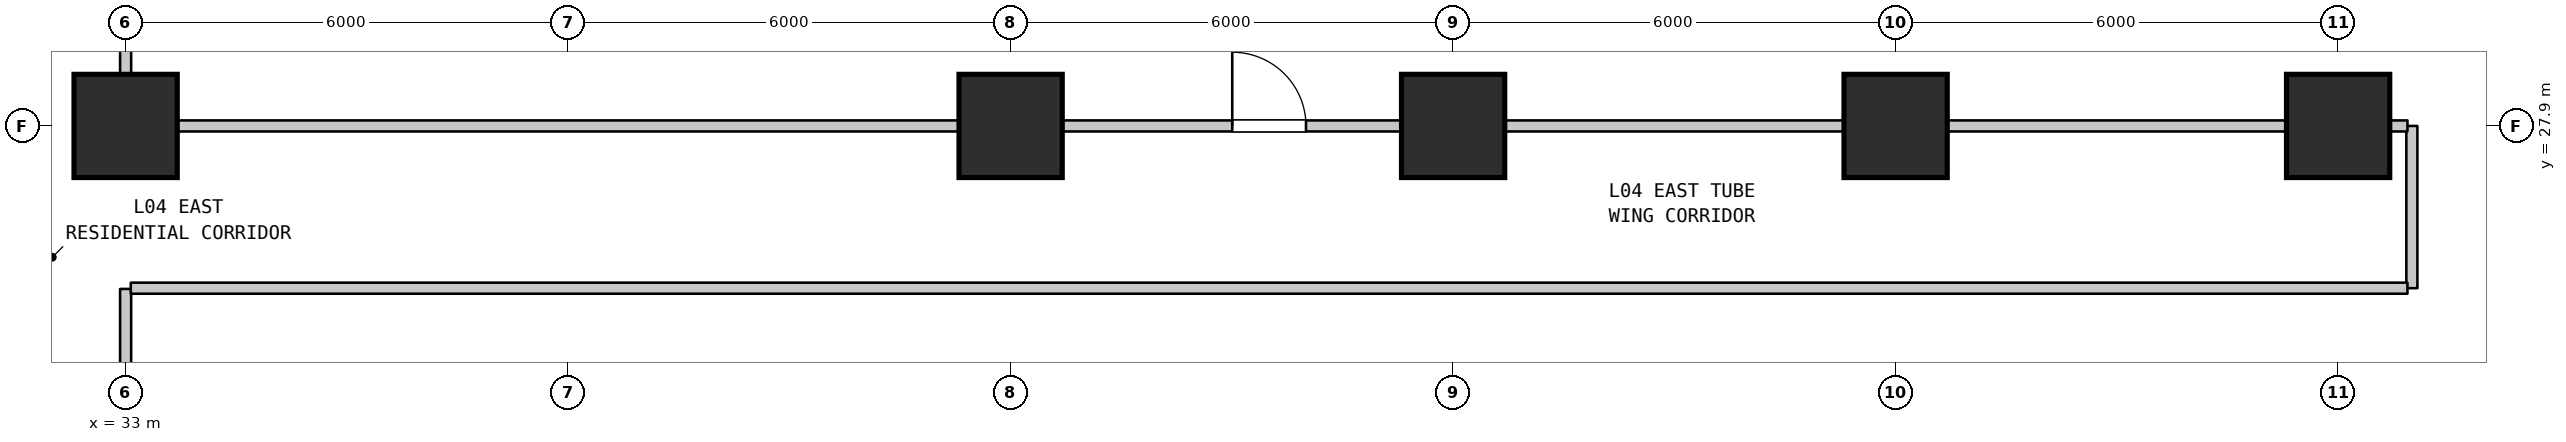
"""IFC4 building model, lengths in metres.
Left out: names, types, materials, properties, quantities, classifications, styles, units other than length and angle.
Written with IfcOpenShell. Run it as: python <this file> out.ifc"""

import sys

from ifc_helpers import new_model, si_unit, direction, frame, frame_2d, origin, origin_2d, place, context, subcontext, project, spatial, rectangle, extrude, element, fill, save


model = new_model("IFC4")
c1 = context("Model", 3, precision=1e-05, world=origin(), true_north=direction((0.0, 1.0)))
c2 = subcontext(c1, "Body", "Model", "MODEL_VIEW")
j1 = project(units=[si_unit("LENGTHUNIT", "METRE"), si_unit("PLANEANGLEUNIT", "RADIAN")], contexts=[c1])
p1 = place(None, origin())
s1 = spatial("IfcSite", under=j1, at=p1, CompositionType="ELEMENT")
p2 = place(p1, origin())
s2 = spatial("IfcBuilding", under=s1, at=p2, CompositionType="ELEMENT")
p3 = place(p2, frame((0.0, 0.0, 24.0)))
s3 = spatial("IfcBuildingStorey", under=s2, at=p3, CompositionType="ELEMENT", Elevation=24.0)
for number, where, z_axis, x_axis in (
    (1, (33.0, 27.9, 0.0), (0.0, 0.0, 1.0), (1.0, 0.0, 0.0)),
    (2, (45.0, 27.9, 0.0), (0.0, 0.0, 1.0), (1.0, 0.0, 0.0)),
    (3, (51.0, 27.9, 0.0), (0.0, 0.0, 1.0), (1.0, 0.0, 0.0)),
    (4, (57.0, 27.9, 0.0), (0.0, 0.0, 1.0), (1.0, 0.0, 0.0)),
    (5, (63.0, 27.9, 0.0), (0.0, 0.0, 1.0), (1.0, 0.0, 0.0)),
):
    element("IfcColumn", number, at=place(p3, frame(where, z_axis=z_axis, x_axis=x_axis)), inside=s3, PredefinedType="COLUMN", context=c2, shape_type="SweptSolid", body=[
        extrude(rectangle(XDim=1.4, YDim=1.4, at=origin_2d()), origin(), (0.0, 0.0, 1.0), 3.7),
    ])
p4 = place(p3, frame((33.0, 19.66, 0.0), z_axis=(0.0, 0.0, 1.0), x_axis=(0.0, 1.0, 0.0)))
e6 = element("IfcWall", 6, at=p4, inside=s3, PredefinedType="STANDARD", context=c2, shape_type="SweptSolid", body=[
    extrude(rectangle(XDim=6.03, YDim=0.15, at=frame_2d((3.015, 0.0))), origin(), (0.0, 0.0, 1.0), 2.885),
])
p5 = place(p3, frame((33.0, 27.91, 0.0), z_axis=(0.0, 0.0, 1.0), x_axis=(0.0, 1.0, 0.0)))
e7 = element("IfcWall", 7, at=p5, inside=s3, PredefinedType="STANDARD", context=c2, shape_type="SweptSolid", body=[
    extrude(rectangle(XDim=9.98, YDim=0.15, at=frame_2d((4.99, 0.0))), origin(), (0.0, 0.0, 1.0), 2.885),
])
p6 = place(p3, frame((64.0, 25.7, 0.0), z_axis=(0.0, 0.0, 1.0), x_axis=(0.0, 1.0, 0.0)))
e8 = element("IfcWall", 8, at=p6, inside=s3, PredefinedType="STANDARD", context=c2, shape_type="SweptSolid", body=[
    extrude(rectangle(XDim=2.2, YDim=0.15, at=frame_2d((1.1, 0.0))), origin(), (0.0, 0.0, 1.0), 3.385),
])
p7 = place(p3, frame((33.07, 25.7, 0.0), z_axis=(0.0, 0.0, 1.0), x_axis=(1.0, 0.0, 0.0)))
e9 = element("IfcWall", 9, at=p7, inside=s3, PredefinedType="STANDARD", context=c2, shape_type="SweptSolid", body=[
    extrude(rectangle(XDim=30.87, YDim=0.15, at=frame_2d((15.435, 0.0))), origin(), (0.0, 0.0, 1.0), 3.385),
])
p8 = place(p3, frame((33.07, 27.9, 0.0), z_axis=(0.0, 0.0, 1.0), x_axis=(1.0, 0.0, 0.0)))
e10 = element("IfcWall", 10, at=p8, inside=s3, PredefinedType="STANDARD", context=c2, shape_type="SweptSolid", body=[
    extrude(rectangle(XDim=30.87, YDim=0.15, at=frame_2d((15.435, 0.0))), origin(), (0.0, 0.0, 1.0), 2.885),
])
p9 = place(p8, frame((14.935, 0.0, 0.0)))
e11 = element("IfcOpeningElement", 11, at=p9, cuts=e10, PredefinedType="OPENING", context=c2, shape_type="SweptSolid", body=[
    extrude(rectangle(XDim=1.0, YDim=2.15, at=frame_2d((0.5, 1.075))), frame((0.0, 0.085, 0.0), z_axis=(0.0, -1.0, 0.0), x_axis=(1.0, 0.0, 0.0)), (0.0, 0.0, 1.0), 0.17),
])
p10 = place(p9, origin())
e12 = element("IfcDoor", 12, at=p10, inside=s3, OperationType="SINGLE_SWING_LEFT", PredefinedType="DOOR", context=c2, shape_type="SweptSolid", body=[
    extrude(rectangle(XDim=1.0, YDim=2.15, at=frame_2d((0.5, 1.075))), frame((0.0, 0.025, 0.0), z_axis=(0.0, -1.0, 0.0), x_axis=(1.0, 0.0, 0.0)), (0.0, 0.0, 1.0), 0.05),
])
fill(e11, e12)
save(model, sys.argv[1])
